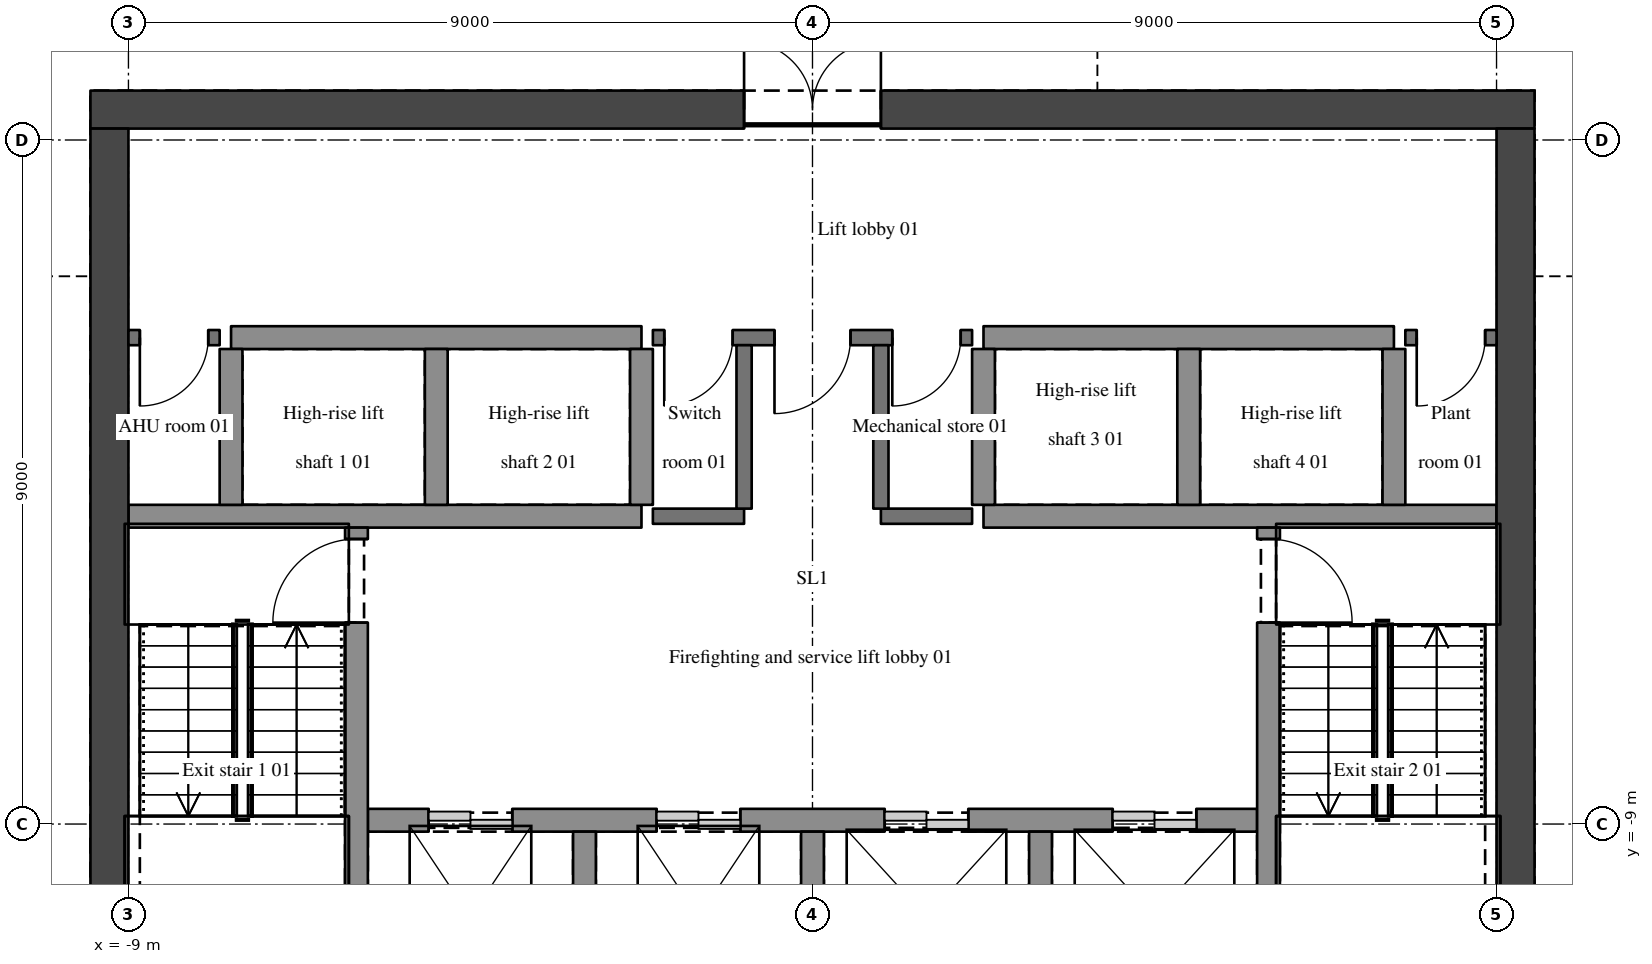
"""IFC4 building model, lengths in metres.
Left out: names, types, materials, properties, quantities, classifications, styles, units other than length and angle.
Written with IfcOpenShell. Run it as: python <this file> out.ifc"""

import sys

from ifc_helpers import new_model, si_unit, direction, frame, frame_2d, origin, place, context, subcontext, project, spatial, rectangle, extrude, element, fill, save


model = new_model("IFC4")
c1 = context("Model", 3, precision=1e-05, world=origin(), true_north=direction((0.0, 1.0)))
c2 = subcontext(c1, "Body", "Model", "MODEL_VIEW")
j1 = project(units=[si_unit("LENGTHUNIT", "METRE"), si_unit("PLANEANGLEUNIT", "RADIAN")], contexts=[c1])
p1 = place(None, origin())
s1 = spatial("IfcSite", under=j1, at=p1, CompositionType="ELEMENT")
p2 = place(p1, origin())
s2 = spatial("IfcBuilding", under=s1, at=p2, CompositionType="ELEMENT")
p3 = place(p2, frame((0.0, 0.0, 210.0)))
s3 = spatial("IfcBuildingStorey", under=s2, at=p3, CompositionType="ELEMENT", Elevation=210.0)
p4 = place(p3, frame((-9.5, 0.4, 0.0), z_axis=(0.0, 0.0, 1.0), x_axis=(1.0, 0.0, 0.0)))
e1 = element("IfcWall", 1, at=p4, inside=s3, PredefinedType="SHEAR", context=c2, shape_type="SweptSolid", body=[
    extrude(rectangle(XDim=19.0, YDim=0.5, at=frame_2d((9.5, 0.0))), origin(), (0.0, 0.0, 1.0), 7.2),
])
p5 = place(p4, frame((8.6, 0.0, 0.0)))
e2 = element("IfcOpeningElement", 2, at=p5, cuts=e1, PredefinedType="OPENING", context=c2, shape_type="SweptSolid", body=[
    extrude(rectangle(XDim=1.8, YDim=2.1, at=frame_2d((0.9, 1.05))), frame((0.0, 0.26, 0.0), z_axis=(0.0, -1.0, 0.0), x_axis=(1.0, 0.0, 0.0)), (0.0, 0.0, 1.0), 0.52),
])
for number, where, z_axis, x_axis in (
    (3, (-9.25, -11.5, 0.0), (0.0, 0.0, 1.0), (0.0, 1.0, 0.0)),
    (4, (9.25, -11.5, 0.0), (0.0, 0.0, 1.0), (0.0, 1.0, 0.0)),
):
    element("IfcWall", number, at=place(p3, frame(where, z_axis=z_axis, x_axis=x_axis)), inside=s3, PredefinedType="SHEAR", context=c2, shape_type="SweptSolid", body=[
        extrude(rectangle(XDim=11.65, YDim=0.5, at=frame_2d((5.825, 0.0))), origin(), (0.0, 0.0, 1.0), 7.2),
    ])
p6 = place(p3, frame((-5.85, -8.95, 0.0), z_axis=(0.0, 0.0, 1.0), x_axis=(1.0, 0.0, 0.0)))
e5 = element("IfcWall", 5, at=p6, inside=s3, PredefinedType="SHEAR", context=c2, shape_type="SweptSolid", body=[
    extrude(rectangle(XDim=11.7, YDim=0.3, at=frame_2d((5.85, 0.0))), origin(), (0.0, 0.0, 1.0), 7.2),
])
p7 = place(p6, frame((0.8, 0.0, 0.0)))
e6 = element("IfcOpeningElement", 6, at=p7, cuts=e5, PredefinedType="OPENING", context=c2, shape_type="SweptSolid", body=[
    extrude(rectangle(XDim=1.1, YDim=2.1, at=frame_2d((0.55, 1.05))), frame((0.0, 0.16, 0.0), z_axis=(0.0, -1.0, 0.0), x_axis=(1.0, 0.0, 0.0)), (0.0, 0.0, 1.0), 0.32),
])
p8 = place(p6, frame((3.8, 0.0, 0.0)))
e7 = element("IfcOpeningElement", 7, at=p8, cuts=e5, PredefinedType="OPENING", context=c2, shape_type="SweptSolid", body=[
    extrude(rectangle(XDim=1.1, YDim=2.1, at=frame_2d((0.55, 1.05))), frame((0.0, 0.16, 0.0), z_axis=(0.0, -1.0, 0.0), x_axis=(1.0, 0.0, 0.0)), (0.0, 0.0, 1.0), 0.32),
])
p9 = place(p6, frame((6.8, 0.0, 0.0)))
e8 = element("IfcOpeningElement", 8, at=p9, cuts=e5, PredefinedType="OPENING", context=c2, shape_type="SweptSolid", body=[
    extrude(rectangle(XDim=1.1, YDim=2.1, at=frame_2d((0.55, 1.05))), frame((0.0, 0.16, 0.0), z_axis=(0.0, -1.0, 0.0), x_axis=(1.0, 0.0, 0.0)), (0.0, 0.0, 1.0), 0.32),
])
p10 = place(p6, frame((9.8, 0.0, 0.0)))
e9 = element("IfcOpeningElement", 9, at=p10, cuts=e5, PredefinedType="OPENING", context=c2, shape_type="SweptSolid", body=[
    extrude(rectangle(XDim=1.1, YDim=2.1, at=frame_2d((0.55, 1.05))), frame((0.0, 0.16, 0.0), z_axis=(0.0, -1.0, 0.0), x_axis=(1.0, 0.0, 0.0)), (0.0, 0.0, 1.0), 0.32),
])
p11 = place(p3, frame((-9.0, -4.95, 0.0), z_axis=(0.0, 0.0, 1.0), x_axis=(1.0, 0.0, 0.0)))
e10 = element("IfcWall", 10, at=p11, inside=s3, PredefinedType="SHEAR", context=c2, shape_type="SweptSolid", body=[
    extrude(rectangle(XDim=6.75, YDim=0.3, at=frame_2d((3.375, 0.0))), origin(), (0.0, 0.0, 1.0), 7.2),
])
for number, where, z_axis, x_axis in (
    (11, (-2.1, -4.95, 0.0), (0.0, 0.0, 1.0), (1.0, 0.0, 0.0)),
    (12, (0.9, -4.95, 0.0), (0.0, 0.0, 1.0), (1.0, 0.0, 0.0)),
):
    element("IfcWall", number, at=place(p3, frame(where, z_axis=z_axis, x_axis=x_axis)), inside=s3, PredefinedType="SOLIDWALL", context=c2, shape_type="SweptSolid", body=[
        extrude(rectangle(XDim=1.2, YDim=0.2, at=frame_2d((0.6, 0.0))), origin(), (0.0, 0.0, 1.0), 6.9),
    ])
p12 = place(p3, frame((2.25, -4.95, 0.0), z_axis=(0.0, 0.0, 1.0), x_axis=(1.0, 0.0, 0.0)))
e13 = element("IfcWall", 13, at=p12, inside=s3, PredefinedType="SHEAR", context=c2, shape_type="SweptSolid", body=[
    extrude(rectangle(XDim=6.75, YDim=0.3, at=frame_2d((3.375, 0.0))), origin(), (0.0, 0.0, 1.0), 7.2),
])
p13 = place(p3, frame((-7.8, -2.6, 0.0), z_axis=(0.0, 0.0, 1.0), x_axis=(-1.0, 0.0, 0.0)))
e14 = element("IfcWall", 14, at=p13, inside=s3, PredefinedType="SOLIDWALL", context=c2, shape_type="SweptSolid", body=[
    extrude(rectangle(XDim=1.2, YDim=0.2, at=frame_2d((0.6, 0.0))), origin(), (0.0, 0.0, 1.0), 6.9),
])
p14 = place(p13, frame((0.15, 0.0, 0.0)))
e15 = element("IfcOpeningElement", 15, at=p14, cuts=e14, PredefinedType="OPENING", context=c2, shape_type="SweptSolid", body=[
    extrude(rectangle(XDim=0.9, YDim=2.1, at=frame_2d((0.45, 1.05))), frame((0.0, 0.11, 0.0), z_axis=(0.0, -1.0, 0.0), x_axis=(1.0, 0.0, 0.0)), (0.0, 0.0, 1.0), 0.22),
])
p15 = place(p3, frame((-7.65, -2.6, 0.0), z_axis=(0.0, 0.0, 1.0), x_axis=(1.0, 0.0, 0.0)))
e16 = element("IfcWall", 16, at=p15, inside=s3, PredefinedType="SHEAR", context=c2, shape_type="SweptSolid", body=[
    extrude(rectangle(XDim=5.4, YDim=0.3, at=frame_2d((2.7, 0.0))), origin(), (0.0, 0.0, 1.0), 7.2),
])
p16 = place(p3, frame((2.1, -2.6, 0.0), z_axis=(0.0, 0.0, 1.0), x_axis=(-1.0, 0.0, 0.0)))
e17 = element("IfcWall", 17, at=p16, inside=s3, PredefinedType="SOLIDWALL", context=c2, shape_type="SweptSolid", body=[
    extrude(rectangle(XDim=4.2, YDim=0.2, at=frame_2d((2.1, 0.0))), origin(), (0.0, 0.0, 1.0), 6.9),
])
p17 = place(p16, frame((1.6, 0.0, 0.0)))
e18 = element("IfcOpeningElement", 18, at=p17, cuts=e17, PredefinedType="OPENING", context=c2, shape_type="SweptSolid", body=[
    extrude(rectangle(XDim=1.0, YDim=2.1, at=frame_2d((0.5, 1.05))), frame((0.0, 0.11, 0.0), z_axis=(0.0, -1.0, 0.0), x_axis=(1.0, 0.0, 0.0)), (0.0, 0.0, 1.0), 0.22),
])
p18 = place(p16, frame((3.15, 0.0, 0.0)))
e19 = element("IfcOpeningElement", 19, at=p18, cuts=e17, PredefinedType="OPENING", context=c2, shape_type="SweptSolid", body=[
    extrude(rectangle(XDim=0.9, YDim=2.1, at=frame_2d((0.45, 1.05))), frame((0.0, 0.11, 0.0), z_axis=(0.0, -1.0, 0.0), x_axis=(1.0, 0.0, 0.0)), (0.0, 0.0, 1.0), 0.22),
])
p19 = place(p16, frame((0.15, 0.0, 0.0)))
e20 = element("IfcOpeningElement", 20, at=p19, cuts=e17, PredefinedType="OPENING", context=c2, shape_type="SweptSolid", body=[
    extrude(rectangle(XDim=0.9, YDim=2.1, at=frame_2d((0.45, 1.05))), frame((0.0, 0.11, 0.0), z_axis=(0.0, -1.0, 0.0), x_axis=(1.0, 0.0, 0.0)), (0.0, 0.0, 1.0), 0.22),
])
p20 = place(p3, frame((2.25, -2.6, 0.0), z_axis=(0.0, 0.0, 1.0), x_axis=(1.0, 0.0, 0.0)))
e21 = element("IfcWall", 21, at=p20, inside=s3, PredefinedType="SHEAR", context=c2, shape_type="SweptSolid", body=[
    extrude(rectangle(XDim=5.4, YDim=0.3, at=frame_2d((2.7, 0.0))), origin(), (0.0, 0.0, 1.0), 7.2),
])
p21 = place(p3, frame((9.0, -2.6, 0.0), z_axis=(0.0, 0.0, 1.0), x_axis=(-1.0, 0.0, 0.0)))
e22 = element("IfcWall", 22, at=p21, inside=s3, PredefinedType="SOLIDWALL", context=c2, shape_type="SweptSolid", body=[
    extrude(rectangle(XDim=1.2, YDim=0.2, at=frame_2d((0.6, 0.0))), origin(), (0.0, 0.0, 1.0), 6.9),
])
p22 = place(p21, frame((0.15, 0.0, 0.0)))
e23 = element("IfcOpeningElement", 23, at=p22, cuts=e22, PredefinedType="OPENING", context=c2, shape_type="SweptSolid", body=[
    extrude(rectangle(XDim=0.9, YDim=2.1, at=frame_2d((0.45, 1.05))), frame((0.0, 0.11, 0.0), z_axis=(0.0, -1.0, 0.0), x_axis=(1.0, 0.0, 0.0)), (0.0, 0.0, 1.0), 0.22),
])
p23 = place(p3, frame((-7.65, -4.8, 0.0), z_axis=(0.0, 0.0, 1.0), x_axis=(0.0, 1.0, 0.0)))
e24 = element("IfcWall", 24, at=p23, inside=s3, PredefinedType="SHEAR", context=c2, shape_type="SweptSolid", body=[
    extrude(rectangle(XDim=2.05, YDim=0.3, at=frame_2d((1.025, 0.0))), origin(), (0.0, 0.0, 1.0), 7.2),
])
p24 = place(p3, frame((-6.0, -11.5, 0.0), z_axis=(0.0, 0.0, 1.0), x_axis=(0.0, 1.0, 0.0)))
e25 = element("IfcWall", 25, at=p24, inside=s3, PredefinedType="SHEAR", context=c2, shape_type="SweptSolid", body=[
    extrude(rectangle(XDim=6.4, YDim=0.3, at=frame_2d((3.2, 0.0))), origin(), (0.0, 0.0, 1.0), 7.2),
])
p25 = place(p24, frame((5.15, 0.0, 0.0)))
e26 = element("IfcOpeningElement", 26, at=p25, cuts=e25, PredefinedType="OPENING", context=c2, shape_type="SweptSolid", body=[
    extrude(rectangle(XDim=1.1, YDim=2.1, at=frame_2d((0.55, 1.05))), frame((0.0, 0.16, 0.0), z_axis=(0.0, -1.0, 0.0), x_axis=(1.0, 0.0, 0.0)), (0.0, 0.0, 1.0), 0.32),
])
p26 = place(p3, frame((-4.95, -4.8, 0.0), z_axis=(0.0, 0.0, 1.0), x_axis=(0.0, 1.0, 0.0)))
e27 = element("IfcWall", 27, at=p26, inside=s3, PredefinedType="SHEAR", context=c2, shape_type="SweptSolid", body=[
    extrude(rectangle(XDim=2.05, YDim=0.3, at=frame_2d((1.025, 0.0))), origin(), (0.0, 0.0, 1.0), 7.2),
])
p27 = place(p3, frame((-3.0, -11.5, 0.0), z_axis=(0.0, 0.0, 1.0), x_axis=(0.0, 1.0, 0.0)))
e28 = element("IfcWall", 28, at=p27, inside=s3, PredefinedType="SHEAR", context=c2, shape_type="SweptSolid", body=[
    extrude(rectangle(XDim=2.4, YDim=0.3, at=frame_2d((1.2, 0.0))), origin(), (0.0, 0.0, 1.0), 7.2),
])
p28 = place(p3, frame((-2.25, -4.8, 0.0), z_axis=(0.0, 0.0, 1.0), x_axis=(0.0, 1.0, 0.0)))
e29 = element("IfcWall", 29, at=p28, inside=s3, PredefinedType="SHEAR", context=c2, shape_type="SweptSolid", body=[
    extrude(rectangle(XDim=2.05, YDim=0.3, at=frame_2d((1.025, 0.0))), origin(), (0.0, 0.0, 1.0), 7.2),
])
p29 = place(p3, frame((-0.9, -4.85, 0.0), z_axis=(0.0, 0.0, 1.0), x_axis=(0.0, 1.0, 0.0)))
e30 = element("IfcWall", 30, at=p29, inside=s3, PredefinedType="SOLIDWALL", context=c2, shape_type="SweptSolid", body=[
    extrude(rectangle(XDim=2.15, YDim=0.2, at=frame_2d((1.075, 0.0))), origin(), (0.0, 0.0, 1.0), 6.9),
])
p30 = place(p3, frame((0.0, -11.5, 0.0), z_axis=(0.0, 0.0, 1.0), x_axis=(0.0, 1.0, 0.0)))
e31 = element("IfcWall", 31, at=p30, inside=s3, PredefinedType="SHEAR", context=c2, shape_type="SweptSolid", body=[
    extrude(rectangle(XDim=2.4, YDim=0.3, at=frame_2d((1.2, 0.0))), origin(), (0.0, 0.0, 1.0), 7.2),
])
p31 = place(p3, frame((0.9, -4.85, 0.0), z_axis=(0.0, 0.0, 1.0), x_axis=(0.0, 1.0, 0.0)))
e32 = element("IfcWall", 32, at=p31, inside=s3, PredefinedType="SOLIDWALL", context=c2, shape_type="SweptSolid", body=[
    extrude(rectangle(XDim=2.15, YDim=0.2, at=frame_2d((1.075, 0.0))), origin(), (0.0, 0.0, 1.0), 6.9),
])
p32 = place(p3, frame((2.25, -4.8, 0.0), z_axis=(0.0, 0.0, 1.0), x_axis=(0.0, 1.0, 0.0)))
e33 = element("IfcWall", 33, at=p32, inside=s3, PredefinedType="SHEAR", context=c2, shape_type="SweptSolid", body=[
    extrude(rectangle(XDim=2.05, YDim=0.3, at=frame_2d((1.025, 0.0))), origin(), (0.0, 0.0, 1.0), 7.2),
])
p33 = place(p3, frame((3.0, -11.5, 0.0), z_axis=(0.0, 0.0, 1.0), x_axis=(0.0, 1.0, 0.0)))
e34 = element("IfcWall", 34, at=p33, inside=s3, PredefinedType="SHEAR", context=c2, shape_type="SweptSolid", body=[
    extrude(rectangle(XDim=2.4, YDim=0.3, at=frame_2d((1.2, 0.0))), origin(), (0.0, 0.0, 1.0), 7.2),
])
p34 = place(p3, frame((4.95, -4.8, 0.0), z_axis=(0.0, 0.0, 1.0), x_axis=(0.0, 1.0, 0.0)))
e35 = element("IfcWall", 35, at=p34, inside=s3, PredefinedType="SHEAR", context=c2, shape_type="SweptSolid", body=[
    extrude(rectangle(XDim=2.05, YDim=0.3, at=frame_2d((1.025, 0.0))), origin(), (0.0, 0.0, 1.0), 7.2),
])
p35 = place(p3, frame((6.0, -5.1, 0.0), z_axis=(0.0, 0.0, 1.0), x_axis=(0.0, -1.0, 0.0)))
e36 = element("IfcWall", 36, at=p35, inside=s3, PredefinedType="SHEAR", context=c2, shape_type="SweptSolid", body=[
    extrude(rectangle(XDim=6.4, YDim=0.3, at=frame_2d((3.2, 0.0))), origin(), (0.0, 0.0, 1.0), 7.2),
])
p36 = place(p35, frame((0.15, 0.0, 0.0)))
e37 = element("IfcOpeningElement", 37, at=p36, cuts=e36, PredefinedType="OPENING", context=c2, shape_type="SweptSolid", body=[
    extrude(rectangle(XDim=1.1, YDim=2.1, at=frame_2d((0.55, 1.05))), frame((0.0, 0.16, 0.0), z_axis=(0.0, -1.0, 0.0), x_axis=(1.0, 0.0, 0.0)), (0.0, 0.0, 1.0), 0.32),
])
p37 = place(p3, frame((7.65, -4.8, 0.0), z_axis=(0.0, 0.0, 1.0), x_axis=(0.0, 1.0, 0.0)))
e38 = element("IfcWall", 38, at=p37, inside=s3, PredefinedType="SHEAR", context=c2, shape_type="SweptSolid", body=[
    extrude(rectangle(XDim=2.05, YDim=0.3, at=frame_2d((1.025, 0.0))), origin(), (0.0, 0.0, 1.0), 7.2),
])
p38 = place(p5, origin())
e39 = element("IfcDoor", 39, at=p38, inside=s3, OperationType="DOUBLE_DOOR_SINGLE_SWING", PredefinedType="DOOR", context=c2, shape_type="SweptSolid", body=[
    extrude(rectangle(XDim=1.8, YDim=2.1, at=frame_2d((0.9, 1.05))), frame((0.0, 0.025, 0.0), z_axis=(0.0, -1.0, 0.0), x_axis=(1.0, 0.0, 0.0)), (0.0, 0.0, 1.0), 0.05),
])
fill(e2, e39)
p39 = place(p17, origin())
e40 = element("IfcDoor", 40, at=p39, inside=s3, OperationType="SINGLE_SWING_RIGHT", PredefinedType="DOOR", context=c2, shape_type="SweptSolid", body=[
    extrude(rectangle(XDim=1.0, YDim=2.1, at=frame_2d((0.5, 1.05))), frame((0.0, 0.025, 0.0), z_axis=(0.0, -1.0, 0.0), x_axis=(1.0, 0.0, 0.0)), (0.0, 0.0, 1.0), 0.05),
])
fill(e18, e40)
p40 = place(p25, origin())
e41 = element("IfcDoor", 41, at=p40, inside=s3, OperationType="SINGLE_SWING_LEFT", PredefinedType="DOOR", context=c2, shape_type="SweptSolid", body=[
    extrude(rectangle(XDim=1.1, YDim=2.1, at=frame_2d((0.55, 1.05))), frame((0.0, 0.025, 0.0), z_axis=(0.0, -1.0, 0.0), x_axis=(1.0, 0.0, 0.0)), (0.0, 0.0, 1.0), 0.05),
])
fill(e26, e41)
p41 = place(p36, origin())
e42 = element("IfcDoor", 42, at=p41, inside=s3, OperationType="SINGLE_SWING_RIGHT", PredefinedType="DOOR", context=c2, shape_type="SweptSolid", body=[
    extrude(rectangle(XDim=1.1, YDim=2.1, at=frame_2d((0.55, 1.05))), frame((0.0, 0.025, 0.0), z_axis=(0.0, -1.0, 0.0), x_axis=(1.0, 0.0, 0.0)), (0.0, 0.0, 1.0), 0.05),
])
fill(e37, e42)
p42 = place(p18, origin())
e43 = element("IfcDoor", 43, at=p42, inside=s3, OperationType="SINGLE_SWING_RIGHT", PredefinedType="DOOR", context=c2, shape_type="SweptSolid", body=[
    extrude(rectangle(XDim=0.9, YDim=2.1, at=frame_2d((0.45, 1.05))), frame((0.0, 0.025, 0.0), z_axis=(0.0, -1.0, 0.0), x_axis=(1.0, 0.0, 0.0)), (0.0, 0.0, 1.0), 0.05),
])
fill(e19, e43)
p43 = place(p19, origin())
e44 = element("IfcDoor", 44, at=p43, inside=s3, OperationType="SINGLE_SWING_RIGHT", PredefinedType="DOOR", context=c2, shape_type="SweptSolid", body=[
    extrude(rectangle(XDim=0.9, YDim=2.1, at=frame_2d((0.45, 1.05))), frame((0.0, 0.025, 0.0), z_axis=(0.0, -1.0, 0.0), x_axis=(1.0, 0.0, 0.0)), (0.0, 0.0, 1.0), 0.05),
])
fill(e20, e44)
p44 = place(p22, origin())
e45 = element("IfcDoor", 45, at=p44, inside=s3, OperationType="SINGLE_SWING_RIGHT", PredefinedType="DOOR", context=c2, shape_type="SweptSolid", body=[
    extrude(rectangle(XDim=0.9, YDim=2.1, at=frame_2d((0.45, 1.05))), frame((0.0, 0.025, 0.0), z_axis=(0.0, -1.0, 0.0), x_axis=(1.0, 0.0, 0.0)), (0.0, 0.0, 1.0), 0.05),
])
fill(e23, e45)
p45 = place(p14, origin())
e46 = element("IfcDoor", 46, at=p45, inside=s3, OperationType="SINGLE_SWING_RIGHT", PredefinedType="DOOR", context=c2, shape_type="SweptSolid", body=[
    extrude(rectangle(XDim=0.9, YDim=2.1, at=frame_2d((0.45, 1.05))), frame((0.0, 0.025, 0.0), z_axis=(0.0, -1.0, 0.0), x_axis=(1.0, 0.0, 0.0)), (0.0, 0.0, 1.0), 0.05),
])
fill(e15, e46)
p46 = place(p7, origin())
e47 = element("IfcDoor", 47, at=p46, inside=s3, OperationType="DOUBLE_DOOR_SLIDING", PredefinedType="DOOR", context=c2, shape_type="SweptSolid", body=[
    extrude(rectangle(XDim=1.1, YDim=2.1, at=frame_2d((0.55, 1.05))), frame((0.0, 0.025, 0.0), z_axis=(0.0, -1.0, 0.0), x_axis=(1.0, 0.0, 0.0)), (0.0, 0.0, 1.0), 0.05),
])
fill(e6, e47)
p47 = place(p8, origin())
e48 = element("IfcDoor", 48, at=p47, inside=s3, OperationType="DOUBLE_DOOR_SLIDING", PredefinedType="DOOR", context=c2, shape_type="SweptSolid", body=[
    extrude(rectangle(XDim=1.1, YDim=2.1, at=frame_2d((0.55, 1.05))), frame((0.0, 0.025, 0.0), z_axis=(0.0, -1.0, 0.0), x_axis=(1.0, 0.0, 0.0)), (0.0, 0.0, 1.0), 0.05),
])
fill(e7, e48)
p48 = place(p9, origin())
e49 = element("IfcDoor", 49, at=p48, inside=s3, OperationType="DOUBLE_DOOR_SLIDING", PredefinedType="DOOR", context=c2, shape_type="SweptSolid", body=[
    extrude(rectangle(XDim=1.1, YDim=2.1, at=frame_2d((0.55, 1.05))), frame((0.0, 0.025, 0.0), z_axis=(0.0, -1.0, 0.0), x_axis=(1.0, 0.0, 0.0)), (0.0, 0.0, 1.0), 0.05),
])
fill(e8, e49)
p49 = place(p10, origin())
e50 = element("IfcDoor", 50, at=p49, inside=s3, OperationType="DOUBLE_DOOR_SLIDING", PredefinedType="DOOR", context=c2, shape_type="SweptSolid", body=[
    extrude(rectangle(XDim=1.1, YDim=2.1, at=frame_2d((0.55, 1.05))), frame((0.0, 0.025, 0.0), z_axis=(0.0, -1.0, 0.0), x_axis=(1.0, 0.0, 0.0)), (0.0, 0.0, 1.0), 0.05),
])
fill(e9, e50)
save(model, sys.argv[1])
